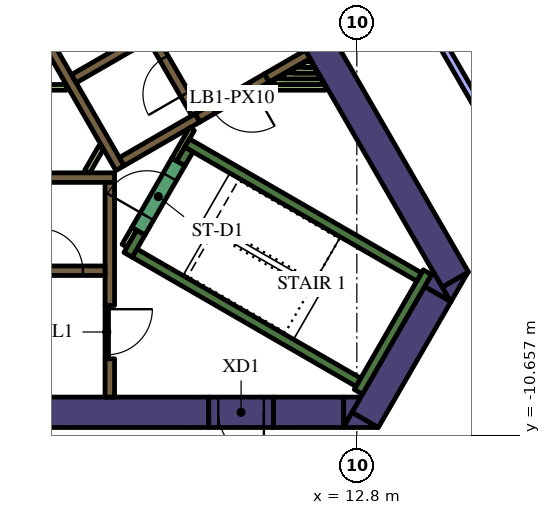
"""IFC4 building model, lengths in metres.
Left out: names, types, materials, properties, quantities, classifications, styles, units other than length and angle.
Written with IfcOpenShell. Run it as: python <this file> out.ifc"""

import sys

from ifc_helpers import new_model, si_unit, direction, frame, frame_2d, origin, place, context, subcontext, project, spatial, polyline, rectangle, outline, extrude, element, fill, save


model = new_model("IFC4")
c1 = context("Model", 3, precision=1e-05, world=origin(), true_north=direction((0.0, 1.0)))
c2 = subcontext(c1, "Body", "Model", "MODEL_VIEW")
j1 = project(units=[si_unit("LENGTHUNIT", "METRE"), si_unit("PLANEANGLEUNIT", "RADIAN")], contexts=[c1])
p1 = place(None, origin())
s1 = spatial("IfcSite", under=j1, at=p1, CompositionType="ELEMENT")
p2 = place(p1, origin())
s2 = spatial("IfcBuilding", under=s1, at=p2, CompositionType="ELEMENT")
p3 = place(p2, frame((0.0, 0.0, 171.0)))
s3 = spatial("IfcBuildingStorey", under=s2, at=p3, CompositionType="ELEMENT", Elevation=171.0)
p4 = place(p3, frame((9.129, 4.289, 0.0), z_axis=(0.0, 0.0, 1.0), x_axis=(0.499995742806, -0.866027861663, 0.0)))
e1 = element("IfcWall", 1, at=p4, inside=s3, PredefinedType="SOLIDWALL", context=c2, shape_type="SweptSolid", body=[
    extrude(rectangle(XDim=12.527, YDim=0.8, at=frame_2d((6.264, 0.0))), origin(), (0.0, 0.0, 1.0), 4.2),
])
p5 = place(p3, origin())
e2 = element("IfcWall", 2, at=p5, inside=s3, PredefinedType="SOLIDWALL", context=c2, shape_type="SweptSolid", body=[
    extrude(outline(polyline([(15.271, -7.15), (15.047, -6.762), (15.719, -6.374), (15.271, -7.15)])), origin(), (0.0, 0.0, 1.0), 4.2),
])
p6 = place(p3, frame((13.018, -10.252, 0.0), z_axis=(0.0, 0.0, 1.0), x_axis=(0.499984020225, 0.866034629516, 0.0)))
e3 = element("IfcWall", 3, at=p6, inside=s3, PredefinedType="SOLIDWALL", context=c2, shape_type="SweptSolid", body=[
    extrude(rectangle(XDim=3.824, YDim=0.8, at=frame_2d((1.912, 0.0))), origin(), (0.0, 0.0, 1.0), 4.2),
])
e4 = element("IfcWall", 4, at=p5, inside=s3, PredefinedType="SOLIDWALL", context=c2, shape_type="SweptSolid", body=[
    extrude(outline(polyline([(12.442, -10.45), (12.671, -10.053), (13.358, -10.45), (12.442, -10.45)])), origin(), (0.0, 0.0, 1.0), 4.2),
])
e5 = element("IfcWall", 5, at=p5, inside=s3, PredefinedType="SOLIDWALL", context=c2, shape_type="SweptSolid", body=[
    extrude(outline(polyline([(14.809, -6.35), (15.257, -7.126), (14.585, -6.738), (14.809, -6.35)])), origin(), (0.0, 0.0, 1.0), 4.2),
])
p7 = place(p3, frame((10.604, -10.05, 0.0), z_axis=(0.0, 0.0, 1.0), x_axis=(1.0, 0.0, 0.0)))
e6 = element("IfcWall", 6, at=p7, inside=s3, PredefinedType="SOLIDWALL", context=c2, shape_type="SweptSolid", body=[
    extrude(rectangle(XDim=1.849, YDim=0.8, at=frame_2d((0.925, 0.0))), origin(), (0.0, 0.0, 1.0), 4.2),
])
e7 = element("IfcWall", 7, at=p5, inside=s3, PredefinedType="SOLIDWALL", context=c2, shape_type="SweptSolid", body=[
    extrude(outline(polyline([(12.904, -9.65), (12.456, -10.426), (12.456, -9.65), (12.904, -9.65)])), origin(), (0.0, 0.0, 1.0), 4.2),
])
p8 = place(p3, frame((-13.378, -10.05, 0.0), z_axis=(0.0, 0.0, 1.0), x_axis=(1.0, 0.0, 0.0)))
e8 = element("IfcWall", 8, at=p8, inside=s3, PredefinedType="SOLIDWALL", context=c2, shape_type="SweptSolid", body=[
    extrude(rectangle(XDim=22.282, YDim=0.8, at=frame_2d((11.141, 0.0))), origin(), (0.0, 0.0, 1.0), 4.2),
])
p9 = place(p3, frame((12.84, -9.511, 0.0), z_axis=(0.0, 0.0, 1.0), x_axis=(0.499997733992, 0.866026712061, 0.0)))
e9 = element("IfcWall", 9, at=p9, inside=s3, PredefinedType="SOLIDWALL", context=c2, shape_type="SweptSolid", body=[
    extrude(rectangle(XDim=3.634, YDim=0.25, at=frame_2d((1.817, 0.0))), origin(), (0.0, 0.0, 1.0), 4.2),
])
p10 = place(p3, frame((12.84, -9.261, 0.0), z_axis=(0.0, 0.0, 1.0), x_axis=(-0.866013990052, 0.500019768644, 0.0)))
e10 = element("IfcWall", 10, at=p10, inside=s3, PredefinedType="SOLIDWALL", context=c2, shape_type="SweptSolid", body=[
    extrude(rectangle(XDim=6.8, YDim=0.25, at=frame_2d((3.4, 0.0))), origin(), (0.0, 0.0, 1.0), 4.2),
])
p11 = place(p3, frame((6.78, -5.906, 0.0), z_axis=(0.0, 0.0, 1.0), x_axis=(0.500223362819, 0.865896406789, 0.0)))
e11 = element("IfcWall", 11, at=p11, inside=s3, PredefinedType="SOLIDWALL", context=c2, shape_type="SweptSolid", body=[
    extrude(rectangle(XDim=0.675, YDim=0.25, at=frame_2d((0.337, 0.0))), origin(), (0.0, 0.0, 1.0), 4.2),
])
p12 = place(p3, frame((8.334, -2.964, 0.0), z_axis=(0.0, 0.0, 1.0), x_axis=(0.866016039709, -0.500016218704, 0.0)))
e12 = element("IfcWall", 12, at=p12, inside=s3, PredefinedType="SOLIDWALL", context=c2, shape_type="SweptSolid", body=[
    extrude(rectangle(XDim=7.05, YDim=0.25, at=frame_2d((3.525, 0.0))), origin(), (0.0, 0.0, 1.0), 4.2),
])
p13 = place(p3, frame((8.168, -3.503, 0.0), z_axis=(0.0, 0.0, 1.0), x_axis=(0.49972245349, 0.866185586049, 0.0)))
e13 = element("IfcWall", 13, at=p13, inside=s3, PredefinedType="SOLIDWALL", context=c2, shape_type="SweptSolid", body=[
    extrude(rectangle(XDim=0.425, YDim=0.25, at=frame_2d((0.212, 0.0))), origin(), (0.0, 0.0, 1.0), 4.2),
])
p14 = place(p3, frame((-5.545, -3.875, 0.0), z_axis=(0.0, 0.0, 1.0), x_axis=(1.0, 0.0, 0.0)))
e14 = element("IfcWall", 14, at=p14, inside=s3, PredefinedType="SOLIDWALL", context=c2, shape_type="SweptSolid", body=[
    extrude(rectangle(XDim=11.97, YDim=0.25, at=frame_2d((5.985, 0.0))), origin(), (0.0, 0.0, 1.0), 4.2),
])
p15 = place(p3, frame((6.3, -7.24, 0.0), z_axis=(0.0, 0.0, 1.0), x_axis=(0.0, 1.0, 0.0)))
e15 = element("IfcWall", 15, at=p15, inside=s3, PredefinedType="SOLIDWALL", context=c2, shape_type="SweptSolid", body=[
    extrude(rectangle(XDim=3.24, YDim=0.25, at=frame_2d((1.62, 0.0))), origin(), (0.0, 0.0, 1.0), 4.2),
])
p16 = place(p3, frame((6.3, -9.65, 0.0), z_axis=(0.0, 0.0, 1.0), x_axis=(0.0, 1.0, 0.0)))
e16 = element("IfcWall", 16, at=p16, inside=s3, PredefinedType="SOLIDWALL", context=c2, shape_type="SweptSolid", body=[
    extrude(rectangle(XDim=1.008, YDim=0.25, at=frame_2d((0.504, 0.0))), origin(), (0.0, 0.0, 1.0), 4.2),
])
p17 = place(p3, frame((11.507, -0.631, 0.0), z_axis=(0.0, 0.0, 1.0), x_axis=(-0.866025525965, -0.499999788377, 0.0)))
e17 = element("IfcWall", 17, at=p17, inside=s3, PredefinedType="SOLIDWALL", context=c2, shape_type="SweptSolid", body=[
    extrude(rectangle(XDim=1.245, YDim=0.25, at=frame_2d((0.622, 0.0))), origin(), (0.0, 0.0, 1.0), 4.2),
])
p18 = place(p3, frame((6.568, -3.627, 0.0), z_axis=(0.0, 0.0, 1.0), x_axis=(-0.499999455981, 0.866025717874, 0.0)))
e18 = element("IfcWall", 18, at=p18, inside=s3, PredefinedType="SOLIDWALL", context=c2, shape_type="SweptSolid", body=[
    extrude(rectangle(XDim=11.978, YDim=0.25, at=frame_2d((5.989, 0.0))), origin(), (0.0, 0.0, 1.0), 4.2),
])
p19 = place(p3, frame((5.354, -1.274, 0.0), z_axis=(0.0, 0.0, 1.0), x_axis=(0.866008176907, 0.50002983664, 0.0)))
e19 = element("IfcWall", 19, at=p19, inside=s3, PredefinedType="SOLIDWALL", context=c2, shape_type="SweptSolid", body=[
    extrude(rectangle(XDim=2.2, YDim=0.25, at=frame_2d((1.1, 0.0))), origin(), (0.0, 0.0, 1.0), 4.2),
])
p20 = place(p3, frame((6.614, -3.456, 0.0), z_axis=(0.0, 0.0, 1.0), x_axis=(0.866025089694, 0.500000544019, 0.0)))
e20 = element("IfcWall", 20, at=p20, inside=s3, PredefinedType="SOLIDWALL", context=c2, shape_type="SweptSolid", body=[
    extrude(rectangle(XDim=2.305, YDim=0.25, at=frame_2d((1.153, 0.0))), origin(), (0.0, 0.0, 1.0), 4.2),
])
p21 = place(p3, frame((10.362, -1.5, 0.0), z_axis=(0.0, 0.0, 1.0), x_axis=(1.0, 0.0, 0.0)))
e21 = element("IfcWall", 21, at=p21, inside=s3, PredefinedType="PARTITIONING", context=c2, shape_type="SweptSolid", body=[
    extrude(rectangle(XDim=1.61, YDim=0.15, at=frame_2d((0.805, 0.0))), origin(), (0.0, 0.0, 1.0), 3.15),
])
p22 = place(p3, frame((10.622, -1.35, 0.0), z_axis=(0.0, 0.0, 1.0), x_axis=(1.0, 0.0, 0.0)))
e22 = element("IfcWall", 22, at=p22, inside=s3, PredefinedType="PARTITIONING", context=c2, shape_type="SweptSolid", body=[
    extrude(rectangle(XDim=1.263, YDim=0.15, at=frame_2d((0.632, 0.0))), origin(), (0.0, 0.0, 1.0), 3.15),
])
p23 = place(p3, frame((10.882, -1.2, 0.0), z_axis=(0.0, 0.0, 1.0), x_axis=(1.0, 0.0, 0.0)))
e23 = element("IfcWall", 23, at=p23, inside=s3, PredefinedType="PARTITIONING", context=c2, shape_type="SweptSolid", body=[
    extrude(rectangle(XDim=0.917, YDim=0.15, at=frame_2d((0.459, 0.0))), origin(), (0.0, 0.0, 1.0), 3.15),
])
p24 = place(p3, frame((11.712, -1.05, 0.0), z_axis=(0.0, 0.0, 1.0), x_axis=(-1.0, 0.0, 0.0)))
e24 = element("IfcWall", 24, at=p24, inside=s3, PredefinedType="PARTITIONING", context=c2, shape_type="SweptSolid", body=[
    extrude(rectangle(XDim=0.571, YDim=0.15, at=frame_2d((0.285, 0.0))), origin(), (0.0, 0.0, 1.0), 3.15),
])
p25 = place(p3, frame((11.401, -0.9, 0.0), z_axis=(0.0, 0.0, 1.0), x_axis=(1.0, 0.0, 0.0)))
e25 = element("IfcWall", 25, at=p25, inside=s3, PredefinedType="PARTITIONING", context=c2, shape_type="SweptSolid", body=[
    extrude(rectangle(XDim=0.224, YDim=0.15, at=frame_2d((0.112, 0.0))), origin(), (0.0, 0.0, 1.0), 3.15),
])
p26 = place(p3, frame((6.945, -5.222, 0.0), z_axis=(0.0, 0.0, 1.0), x_axis=(-0.499818422106, -0.866130212453, 0.0)))
e26 = element("IfcWall", 26, at=p26, inside=s3, PredefinedType="PARTITIONING", context=c2, shape_type="SweptSolid", body=[
    extrude(rectangle(XDim=0.514, YDim=0.15, at=frame_2d((0.257, 0.0))), origin(), (0.0, 0.0, 1.0), 3.15),
])
p27 = place(p3, frame((8.459, -2.599, 0.0), z_axis=(0.0, 0.0, 1.0), x_axis=(-0.500041054325, -0.866001699761, 0.0)))
e27 = element("IfcWall", 27, at=p27, inside=s3, PredefinedType="PARTITIONING", context=c2, shape_type="SweptSolid", body=[
    extrude(rectangle(XDim=0.929, YDim=0.15, at=frame_2d((0.464, 0.0))), origin(), (0.0, 0.0, 1.0), 4.2),
])
p28 = place(p3, frame((5.705, -3.718, 0.0), z_axis=(0.0, 0.0, 1.0), x_axis=(0.499962090823, 0.866047289552, 0.0)))
e28 = element("IfcWall", 28, at=p28, inside=s3, PredefinedType="PARTITIONING", context=c2, shape_type="SweptSolid", body=[
    extrude(rectangle(XDim=0.735, YDim=0.15, at=frame_2d((0.367, 0.0))), origin(), (0.0, 0.0, 1.0), 3.15),
])
p29 = place(p3, frame((-4.2, -1.5, 0.0), z_axis=(0.0, 0.0, 1.0), x_axis=(1.0, 0.0, 0.0)))
e29 = element("IfcWall", 29, at=p29, inside=s3, PredefinedType="PARTITIONING", context=c2, shape_type="SweptSolid", body=[
    extrude(rectangle(XDim=9.359, YDim=0.15, at=frame_2d((4.68, 0.0))), origin(), (0.0, 0.0, 1.0), 3.15),
])
p30 = place(p3, frame((-6.175, -6.325, 0.0), z_axis=(0.0, 0.0, 1.0), x_axis=(1.0, 0.0, 0.0)))
e30 = element("IfcWall", 30, at=p30, inside=s3, PredefinedType="SOLIDWALL", context=c2, shape_type="SweptSolid", body=[
    extrude(rectangle(XDim=12.35, YDim=0.25, at=frame_2d((6.175, 0.0))), origin(), (0.0, 0.0, 1.0), 4.2),
])
p31 = place(p30, frame((0.585, 0.0, 0.0)))
e31 = element("IfcOpeningElement", 31, at=p31, cuts=e30, PredefinedType="OPENING", context=c2, shape_type="SweptSolid", body=[
    extrude(rectangle(XDim=1.1, YDim=2.1, at=frame_2d((0.55, 1.05))), frame((0.0, 0.135, 0.0), z_axis=(0.0, -1.0, 0.0), x_axis=(1.0, 0.0, 0.0)), (0.0, 0.0, 1.0), 0.27),
])
p32 = place(p30, frame((3.105, 0.0, 0.0)))
e32 = element("IfcOpeningElement", 32, at=p32, cuts=e30, PredefinedType="OPENING", context=c2, shape_type="SweptSolid", body=[
    extrude(rectangle(XDim=1.1, YDim=2.1, at=frame_2d((0.55, 1.05))), frame((0.0, 0.135, 0.0), z_axis=(0.0, -1.0, 0.0), x_axis=(1.0, 0.0, 0.0)), (0.0, 0.0, 1.0), 0.27),
])
p33 = place(p30, frame((5.625, 0.0, 0.0)))
e33 = element("IfcOpeningElement", 33, at=p33, cuts=e30, PredefinedType="OPENING", context=c2, shape_type="SweptSolid", body=[
    extrude(rectangle(XDim=1.1, YDim=2.1, at=frame_2d((0.55, 1.05))), frame((0.0, 0.135, 0.0), z_axis=(0.0, -1.0, 0.0), x_axis=(1.0, 0.0, 0.0)), (0.0, 0.0, 1.0), 0.27),
])
p34 = place(p30, frame((8.145, 0.0, 0.0)))
e34 = element("IfcOpeningElement", 34, at=p34, cuts=e30, PredefinedType="OPENING", context=c2, shape_type="SweptSolid", body=[
    extrude(rectangle(XDim=1.1, YDim=2.1, at=frame_2d((0.55, 1.05))), frame((0.0, 0.135, 0.0), z_axis=(0.0, -1.0, 0.0), x_axis=(1.0, 0.0, 0.0)), (0.0, 0.0, 1.0), 0.27),
])
p35 = place(p30, frame((10.665, 0.0, 0.0)))
e35 = element("IfcOpeningElement", 35, at=p35, cuts=e30, PredefinedType="OPENING", context=c2, shape_type="SweptSolid", body=[
    extrude(rectangle(XDim=1.1, YDim=2.1, at=frame_2d((0.55, 1.05))), frame((0.0, 0.135, 0.0), z_axis=(0.0, -1.0, 0.0), x_axis=(1.0, 0.0, 0.0)), (0.0, 0.0, 1.0), 0.27),
])
p36 = place(p3, frame((8.565, -2.185, 0.0), z_axis=(0.0, 0.0, 1.0), x_axis=(-0.499997954832, 0.866026584559, 0.0)))
e36 = element("IfcWall", 36, at=p36, inside=s3, PredefinedType="SOLIDWALL", context=c2, shape_type="SweptSolid", body=[
    extrude(rectangle(XDim=12.35, YDim=0.25, at=frame_2d((6.175, 0.0))), origin(), (0.0, 0.0, 1.0), 4.2),
])
p37 = place(p36, frame((0.585, 0.0, 0.0)))
e37 = element("IfcOpeningElement", 37, at=p37, cuts=e36, PredefinedType="OPENING", context=c2, shape_type="SweptSolid", body=[
    extrude(rectangle(XDim=1.1, YDim=2.1, at=frame_2d((0.55, 1.05))), frame((0.0, 0.135, 0.0), z_axis=(0.0, -1.0, 0.0), x_axis=(1.0, 0.0, 0.0)), (0.0, 0.0, 1.0), 0.27),
])
p38 = place(p3, frame((7.053, -5.284, 0.0), z_axis=(0.0, 0.0, 1.0), x_axis=(0.500078061341, 0.865980330357, 0.0)))
e38 = element("IfcWall", 38, at=p38, inside=s3, PredefinedType="SOLIDWALL", context=c2, shape_type="SweptSolid", body=[
    extrude(rectangle(XDim=2.1, YDim=0.4, at=frame_2d((1.05, 0.0))), origin(), (0.0, 0.0, 1.0), 4.2),
])
p39 = place(p38, frame((0.45, 0.0, 0.0)))
e39 = element("IfcOpeningElement", 39, at=p39, cuts=e38, PredefinedType="OPENING", context=c2, shape_type="SweptSolid", body=[
    extrude(rectangle(XDim=1.2, YDim=2.1, at=frame_2d((0.6, 1.05))), frame((0.0, 0.21, 0.0), z_axis=(0.0, -1.0, 0.0), x_axis=(1.0, 0.0, 0.0)), (0.0, 0.0, 1.0), 0.42),
])
p40 = place(p3, frame((6.22, -7.237, 0.0), z_axis=(0.0, 0.0, 1.0), x_axis=(0.0, -1.0, 0.0)))
e40 = element("IfcWall", 40, at=p40, inside=s3, PredefinedType="PARTITIONING", context=c2, shape_type="SweptSolid", body=[
    extrude(rectangle(XDim=1.4, YDim=0.09, at=frame_2d((0.7, 0.0))), origin(), (0.0, 0.0, 1.0), 3.15),
])
p41 = place(p40, frame((0.1, 0.0, 0.0)))
e41 = element("IfcOpeningElement", 41, at=p41, cuts=e40, PredefinedType="OPENING", context=c2, shape_type="SweptSolid", body=[
    extrude(rectangle(XDim=1.2, YDim=2.1, at=frame_2d((0.6, 1.05))), frame((0.0, 0.055, 0.0), z_axis=(0.0, -1.0, 0.0), x_axis=(1.0, 0.0, 0.0)), (0.0, 0.0, 1.0), 0.11),
])
p42 = place(p3, frame((10.429, -1.253, 0.0), z_axis=(0.0, 0.0, 1.0), x_axis=(-0.866009402589, -0.500027713859, 0.0)))
e42 = element("IfcWall", 42, at=p42, inside=s3, PredefinedType="SOLIDWALL", context=c2, shape_type="SweptSolid", body=[
    extrude(rectangle(XDim=2.1, YDim=0.25, at=frame_2d((1.05, 0.0))), origin(), (0.0, 0.0, 1.0), 4.2),
])
p43 = place(p42, frame((0.45, 0.0, 0.0)))
e43 = element("IfcOpeningElement", 43, at=p43, cuts=e42, PredefinedType="OPENING", context=c2, shape_type="SweptSolid", body=[
    extrude(rectangle(XDim=1.2, YDim=2.1, at=frame_2d((0.6, 1.05))), frame((0.0, 0.135, 0.0), z_axis=(0.0, -1.0, 0.0), x_axis=(1.0, 0.0, 0.0)), (0.0, 0.0, 1.0), 0.27),
])
p44 = place(p3, frame((10.604, -10.05, 0.0), z_axis=(0.0, 0.0, 1.0), x_axis=(-1.0, 0.0, 0.0)))
e44 = element("IfcWall", 44, at=p44, inside=s3, PredefinedType="SOLIDWALL", context=c2, shape_type="SweptSolid", body=[
    extrude(rectangle(XDim=1.7, YDim=0.8, at=frame_2d((0.85, 0.0))), origin(), (0.0, 0.0, 1.0), 4.2),
])
p45 = place(p44, frame((0.25, 0.0, 0.0)))
e45 = element("IfcOpeningElement", 45, at=p45, cuts=e44, PredefinedType="OPENING", context=c2, shape_type="SweptSolid", body=[
    extrude(rectangle(XDim=1.2, YDim=2.1, at=frame_2d((0.6, 1.05))), frame((0.0, 0.41, 0.0), z_axis=(0.0, -1.0, 0.0), x_axis=(1.0, 0.0, 0.0)), (0.0, 0.0, 1.0), 0.82),
])
p46 = place(p3, frame((14.766, -12.824, 0.0), z_axis=(0.0, 0.0, 1.0), x_axis=(0.500009869004, 0.866019705837, 0.0)))
e46 = element("IfcWall", 46, at=p46, inside=s3, PredefinedType="PARTITIONING", context=c2, shape_type="SweptSolid", body=[
    extrude(rectangle(XDim=7.475, YDim=0.2, at=frame_2d((3.738, 0.0))), origin(), (0.0, 0.0, 1.0), 3.15),
])
p47 = place(p3, frame((18.489, -6.324, 0.0), z_axis=(0.0, 0.0, 1.0), x_axis=(-0.500003913404, 0.866023144368, 0.0)))
e47 = element("IfcWall", 47, at=p47, inside=s3, PredefinedType="PARTITIONING", context=c2, shape_type="SweptSolid", body=[
    extrude(rectangle(XDim=8.234, YDim=0.2, at=frame_2d((4.117, 0.0))), origin(), (0.0, 0.0, 1.0), 3.15),
])
p48 = place(p35, origin())
e48 = element("IfcDoor", 48, at=p48, inside=s3, OperationType="DOUBLE_DOOR_SLIDING", PredefinedType="DOOR", context=c2, shape_type="SweptSolid", body=[
    extrude(rectangle(XDim=1.1, YDim=2.1, at=frame_2d((0.55, 1.05))), frame((0.0, 0.025, 0.0), z_axis=(0.0, -1.0, 0.0), x_axis=(1.0, 0.0, 0.0)), (0.0, 0.0, 1.0), 0.05),
])
fill(e35, e48)
p49 = place(p37, origin())
e49 = element("IfcDoor", 49, at=p49, inside=s3, OperationType="DOUBLE_DOOR_SLIDING", PredefinedType="DOOR", context=c2, shape_type="SweptSolid", body=[
    extrude(rectangle(XDim=1.1, YDim=2.1, at=frame_2d((0.55, 1.05))), frame((0.0, 0.025, 0.0), z_axis=(0.0, -1.0, 0.0), x_axis=(1.0, 0.0, 0.0)), (0.0, 0.0, 1.0), 0.05),
])
fill(e37, e49)
p50 = place(p39, origin())
e50 = element("IfcDoor", 50, at=p50, inside=s3, OperationType="SINGLE_SWING_LEFT", PredefinedType="DOOR", context=c2, shape_type="SweptSolid", body=[
    extrude(rectangle(XDim=1.2, YDim=2.1, at=frame_2d((0.6, 1.05))), frame((0.0, 0.025, 0.0), z_axis=(0.0, -1.0, 0.0), x_axis=(1.0, 0.0, 0.0)), (0.0, 0.0, 1.0), 0.05),
])
fill(e39, e50)
p51 = place(p41, origin())
e51 = element("IfcDoor", 51, at=p51, inside=s3, OperationType="SINGLE_SWING_LEFT", PredefinedType="DOOR", context=c2, shape_type="SweptSolid", body=[
    extrude(rectangle(XDim=1.2, YDim=2.1, at=frame_2d((0.6, 1.05))), frame((0.0, 0.025, 0.0), z_axis=(0.0, -1.0, 0.0), x_axis=(1.0, 0.0, 0.0)), (0.0, 0.0, 1.0), 0.05),
])
fill(e41, e51)
p52 = place(p43, origin())
e52 = element("IfcDoor", 52, at=p52, inside=s3, OperationType="SINGLE_SWING_LEFT", PredefinedType="DOOR", context=c2, shape_type="SweptSolid", body=[
    extrude(rectangle(XDim=1.2, YDim=2.1, at=frame_2d((0.6, 1.05))), frame((0.0, 0.025, 0.0), z_axis=(0.0, -1.0, 0.0), x_axis=(1.0, 0.0, 0.0)), (0.0, 0.0, 1.0), 0.05),
])
fill(e43, e52)
p53 = place(p45, origin())
e53 = element("IfcDoor", 53, at=p53, inside=s3, OperationType="SINGLE_SWING_LEFT", PredefinedType="DOOR", context=c2, shape_type="SweptSolid", body=[
    extrude(rectangle(XDim=1.2, YDim=2.1, at=frame_2d((0.6, 1.05))), frame((0.0, 0.025, 0.0), z_axis=(0.0, -1.0, 0.0), x_axis=(1.0, 0.0, 0.0)), (0.0, 0.0, 1.0), 0.05),
])
fill(e45, e53)
save(model, sys.argv[1])
